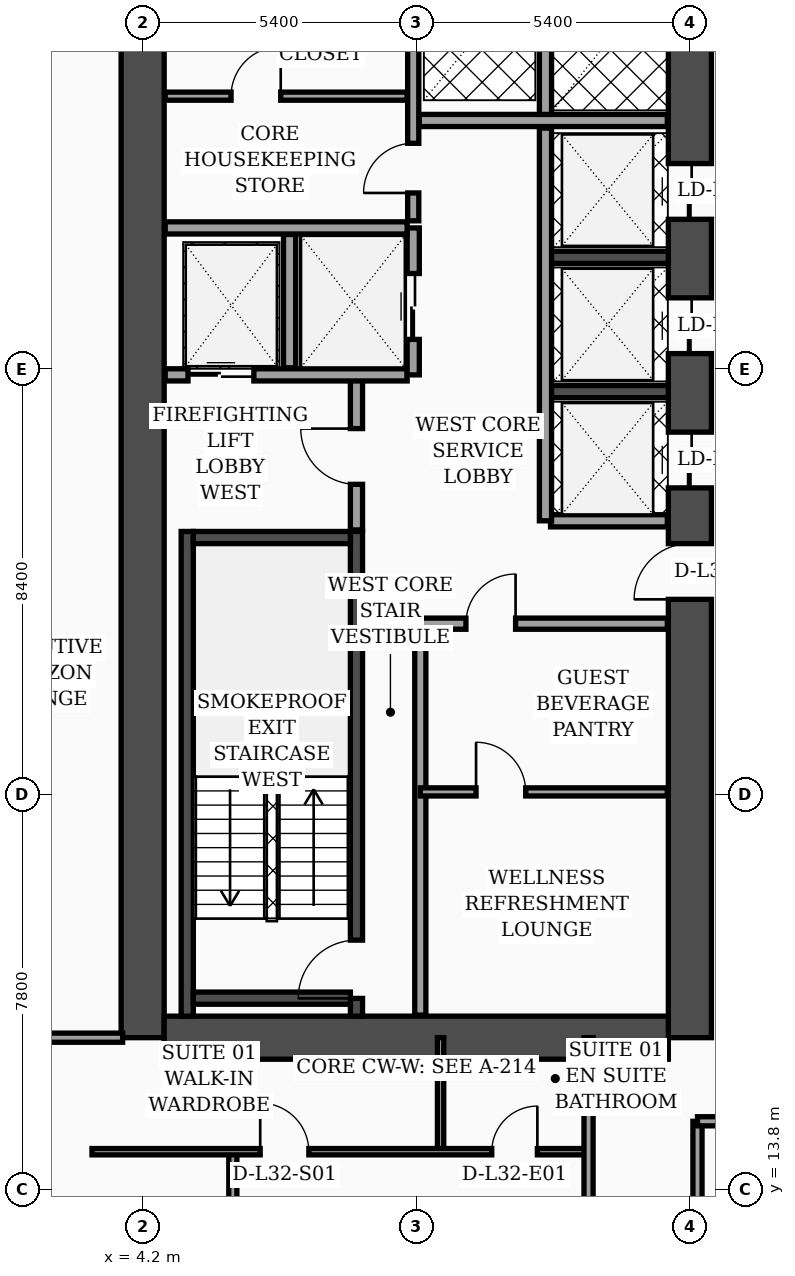
"""IFC4 building model, lengths in metres.
Left out: names, types, materials, properties, quantities, classifications, styles, units other than length and angle.
Written with IfcOpenShell. Run it as: python <this file> out.ifc"""

import sys

from ifc_helpers import new_model, si_unit, direction, frame, frame_2d, origin, place, context, subcontext, project, spatial, rectangle, extrude, element, fill, save


model = new_model("IFC4")
c1 = context("Model", 3, precision=1e-05, world=origin(), true_north=direction((0.0, 1.0)))
c2 = subcontext(c1, "Body", "Model", "MODEL_VIEW")
j1 = project(units=[si_unit("LENGTHUNIT", "METRE"), si_unit("PLANEANGLEUNIT", "RADIAN")], contexts=[c1])
p1 = place(None, origin())
s1 = spatial("IfcSite", under=j1, at=p1, CompositionType="ELEMENT")
p2 = place(p1, origin())
s2 = spatial("IfcBuilding", under=s1, at=p2, CompositionType="ELEMENT")
p3 = place(p2, frame((0.0, 0.0, 131.6)))
s3 = spatial("IfcBuildingStorey", under=s2, at=p3, CompositionType="ELEMENT", Elevation=131.6)
p4 = place(p3, frame((4.2, 16.8, 0.0), z_axis=(0.0, 0.0, 1.0), x_axis=(0.0, 1.0, 0.0)))
e1 = element("IfcWall", 1, at=p4, inside=s3, PredefinedType="SHEAR", context=c2, shape_type="SweptSolid", body=[
    extrude(rectangle(XDim=21.6, YDim=0.85, at=frame_2d((10.8, 0.0))), origin(), (0.0, 0.0, 1.0), 3.56),
])
p5 = place(p3, frame((15.0, 16.8, 0.0), z_axis=(0.0, 0.0, 1.0), x_axis=(0.0, 1.0, 0.0)))
e2 = element("IfcWall", 2, at=p5, inside=s3, PredefinedType="SHEAR", context=c2, shape_type="SweptSolid", body=[
    extrude(rectangle(XDim=21.6, YDim=0.85, at=frame_2d((10.8, 0.0))), origin(), (0.0, 0.0, 1.0), 3.56),
])
p6 = place(p5, frame((8.65, 0.0, 0.0)))
e3 = element("IfcOpeningElement", 3, at=p6, cuts=e2, PredefinedType="OPENING", context=c2, shape_type="SweptSolid", body=[
    extrude(rectangle(XDim=1.1, YDim=2.2, at=frame_2d((0.55, 1.1))), frame((0.0, 0.435, 0.0), z_axis=(0.0, -1.0, 0.0), x_axis=(1.0, 0.0, 0.0)), (0.0, 0.0, 1.0), 0.87),
])
p7 = place(p5, frame((10.85, 0.0, 0.0)))
e4 = element("IfcOpeningElement", 4, at=p7, cuts=e2, PredefinedType="OPENING", context=c2, shape_type="SweptSolid", body=[
    extrude(rectangle(XDim=1.1, YDim=2.2, at=frame_2d((0.55, 1.1))), frame((0.0, 0.435, 0.0), z_axis=(0.0, -1.0, 0.0), x_axis=(1.0, 0.0, 0.0)), (0.0, 0.0, 1.0), 0.87),
])
p8 = place(p5, frame((13.5, 0.0, 0.0)))
e5 = element("IfcOpeningElement", 5, at=p8, cuts=e2, PredefinedType="OPENING", context=c2, shape_type="SweptSolid", body=[
    extrude(rectangle(XDim=1.1, YDim=2.2, at=frame_2d((0.55, 1.1))), frame((0.0, 0.435, 0.0), z_axis=(0.0, -1.0, 0.0), x_axis=(1.0, 0.0, 0.0)), (0.0, 0.0, 1.0), 0.87),
])
p9 = place(p5, frame((16.15, 0.0, 0.0)))
e6 = element("IfcOpeningElement", 6, at=p9, cuts=e2, PredefinedType="OPENING", context=c2, shape_type="SweptSolid", body=[
    extrude(rectangle(XDim=1.1, YDim=2.2, at=frame_2d((0.55, 1.1))), frame((0.0, 0.435, 0.0), z_axis=(0.0, -1.0, 0.0), x_axis=(1.0, 0.0, 0.0)), (0.0, 0.0, 1.0), 0.87),
])
p10 = place(p3, frame((4.625, 16.8, 0.0), z_axis=(0.0, 0.0, 1.0), x_axis=(1.0, 0.0, 0.0)))
e7 = element("IfcWall", 7, at=p10, inside=s3, PredefinedType="SHEAR", context=c2, shape_type="SweptSolid", body=[
    extrude(rectangle(XDim=9.95, YDim=0.85, at=frame_2d((4.975, 0.0))), origin(), (0.0, 0.0, 1.0), 3.56),
])
p11 = place(p3, frame((5.08, 17.225, 0.0), z_axis=(0.0, 0.0, 1.0), x_axis=(0.0, 1.0, 0.0)))
e8 = element("IfcWall", 8, at=p11, inside=s3, PredefinedType="SOLIDWALL", context=c2, shape_type="SweptSolid", body=[
    extrude(rectangle(XDim=9.565, YDim=0.24, at=frame_2d((4.782, 0.0))), origin(), (0.0, 0.0, 1.0), 3.56),
])
p12 = place(p3, frame((8.42, 17.225, 0.0), z_axis=(0.0, 0.0, 1.0), x_axis=(0.0, 1.0, 0.0)))
e9 = element("IfcWall", 9, at=p12, inside=s3, PredefinedType="SOLIDWALL", context=c2, shape_type="SweptSolid", body=[
    extrude(rectangle(XDim=9.565, YDim=0.24, at=frame_2d((4.782, 0.0))), origin(), (0.0, 0.0, 1.0), 3.56),
])
p13 = place(p12, frame((0.35, 0.0, 0.0)))
e10 = element("IfcOpeningElement", 10, at=p13, cuts=e9, PredefinedType="OPENING", context=c2, shape_type="SweptSolid", body=[
    extrude(rectangle(XDim=1.15, YDim=2.2, at=frame_2d((0.575, 1.1))), frame((0.0, 0.13, 0.0), z_axis=(0.0, -1.0, 0.0), x_axis=(1.0, 0.0, 0.0)), (0.0, 0.0, 1.0), 0.26),
])
for number, where, z_axis, x_axis in (
    (11, (5.2, 17.58, 0.0), (0.0, 0.0, 1.0), (1.0, 0.0, 0.0)),
    (12, (5.2, 26.67, 0.0), (0.0, 0.0, 1.0), (1.0, 0.0, 0.0)),
):
    element("IfcWall", number, at=place(p3, frame(where, z_axis=z_axis, x_axis=x_axis)), inside=s3, PredefinedType="SOLIDWALL", context=c2, shape_type="SweptSolid", body=[
        extrude(rectangle(XDim=3.1, YDim=0.24, at=frame_2d((1.55, 0.0))), origin(), (0.0, 0.0, 1.0), 3.56),
    ])
for number, where, z_axis, x_axis in (
    (13, (12.18, 29.55, 0.0), (0.0, 0.0, 1.0), (1.0, 0.0, 0.0)),
    (14, (12.18, 32.2, 0.0), (0.0, 0.0, 1.0), (1.0, 0.0, 0.0)),
):
    element("IfcWall", number, at=place(p3, frame(where, z_axis=z_axis, x_axis=x_axis)), inside=s3, PredefinedType="SOLIDWALL", context=c2, shape_type="SweptSolid", body=[
        extrude(rectangle(XDim=2.395, YDim=0.24, at=frame_2d((1.198, 0.0))), origin(), (0.0, 0.0, 1.0), 3.56),
    ])
p14 = place(p3, frame((8.42, 26.82, 0.0), z_axis=(0.0, 0.0, 1.0), x_axis=(0.0, 1.0, 0.0)))
e15 = element("IfcWall", 15, at=p14, inside=s3, PredefinedType="SOLIDWALL", context=c2, shape_type="SweptSolid", body=[
    extrude(rectangle(XDim=3.0, YDim=0.24, at=frame_2d((1.5, 0.0))), origin(), (0.0, 0.0, 1.0), 3.56),
])
p15 = place(p14, frame((0.9, 0.0, 0.0)))
e16 = element("IfcOpeningElement", 16, at=p15, cuts=e15, PredefinedType="OPENING", context=c2, shape_type="SweptSolid", body=[
    extrude(rectangle(XDim=1.1, YDim=2.2, at=frame_2d((0.55, 1.1))), frame((0.0, 0.13, 0.0), z_axis=(0.0, -1.0, 0.0), x_axis=(1.0, 0.0, 0.0)), (0.0, 0.0, 1.0), 0.26),
])
p16 = place(p3, frame((4.645, 29.88, 0.0), z_axis=(0.0, 0.0, 1.0), x_axis=(1.0, 0.0, 0.0)))
e17 = element("IfcWall", 17, at=p16, inside=s3, PredefinedType="SOLIDWALL", context=c2, shape_type="SweptSolid", body=[
    extrude(rectangle(XDim=4.775, YDim=0.24, at=frame_2d((2.387, 0.0))), origin(), (0.0, 0.0, 1.0), 3.56),
])
p17 = place(p16, frame((0.45, 0.0, 0.0)))
e18 = element("IfcOpeningElement", 18, at=p17, cuts=e17, PredefinedType="OPENING", context=c2, shape_type="SweptSolid", body=[
    extrude(rectangle(XDim=1.3, YDim=2.35, at=frame_2d((0.65, 1.175))), frame((0.0, 0.13, 0.0), z_axis=(0.0, -1.0, 0.0), x_axis=(1.0, 0.0, 0.0)), (0.0, 0.0, 1.0), 0.26),
])
p18 = place(p3, frame((7.1, 30.02, 0.0), z_axis=(0.0, 0.0, 1.0), x_axis=(0.0, 1.0, 0.0)))
e19 = element("IfcWall", 19, at=p18, inside=s3, PredefinedType="SOLIDWALL", context=c2, shape_type="SweptSolid", body=[
    extrude(rectangle(XDim=2.63, YDim=0.24, at=frame_2d((1.315, 0.0))), origin(), (0.0, 0.0, 1.0), 3.56),
])
p19 = place(p3, frame((9.54, 29.88, 0.0), z_axis=(0.0, 0.0, 1.0), x_axis=(0.0, 1.0, 0.0)))
e20 = element("IfcWall", 20, at=p19, inside=s3, PredefinedType="SOLIDWALL", context=c2, shape_type="SweptSolid", body=[
    extrude(rectangle(XDim=2.9, YDim=0.24, at=frame_2d((1.45, 0.0))), origin(), (0.0, 0.0, 1.0), 3.56),
])
p20 = place(p19, frame((0.7, 0.0, 0.0)))
e21 = element("IfcOpeningElement", 21, at=p20, cuts=e20, PredefinedType="OPENING", context=c2, shape_type="SweptSolid", body=[
    extrude(rectangle(XDim=1.3, YDim=2.35, at=frame_2d((0.65, 1.175))), frame((0.0, 0.13, 0.0), z_axis=(0.0, -1.0, 0.0), x_axis=(1.0, 0.0, 0.0)), (0.0, 0.0, 1.0), 0.26),
])
p21 = place(p3, frame((4.645, 32.78, 0.0), z_axis=(0.0, 0.0, 1.0), x_axis=(1.0, 0.0, 0.0)))
e22 = element("IfcWall", 22, at=p21, inside=s3, PredefinedType="SOLIDWALL", context=c2, shape_type="SweptSolid", body=[
    extrude(rectangle(XDim=4.775, YDim=0.24, at=frame_2d((2.387, 0.0))), origin(), (0.0, 0.0, 1.0), 3.19),
])
p22 = place(p3, frame((9.68, 17.245, 0.0), z_axis=(0.0, 0.0, 1.0), x_axis=(0.0, 1.0, 0.0)))
e23 = element("IfcWall", 23, at=p22, inside=s3, PredefinedType="SOLIDWALL", context=c2, shape_type="SweptSolid", body=[
    extrude(rectangle(XDim=7.755, YDim=0.22, at=frame_2d((3.877, 0.0))), origin(), (0.0, 0.0, 1.0), 3.56),
])
p23 = place(p3, frame((4.645, 35.38, 0.0), z_axis=(0.0, 0.0, 1.0), x_axis=(1.0, 0.0, 0.0)))
e24 = element("IfcWall", 24, at=p23, inside=s3, PredefinedType="PARTITIONING", context=c2, shape_type="SweptSolid", body=[
    extrude(rectangle(XDim=4.775, YDim=0.16, at=frame_2d((2.387, 0.0))), origin(), (0.0, 0.0, 1.0), 3.56),
])
p24 = place(p23, frame((1.3, 0.0, 0.0)))
e25 = element("IfcOpeningElement", 25, at=p24, cuts=e24, PredefinedType="OPENING", context=c2, shape_type="SweptSolid", body=[
    extrude(rectangle(XDim=0.98, YDim=2.15, at=frame_2d((0.49, 1.075))), frame((0.0, 0.09, 0.0), z_axis=(0.0, -1.0, 0.0), x_axis=(1.0, 0.0, 0.0)), (0.0, 0.0, 1.0), 0.18),
])
p25 = place(p3, frame((9.54, 32.92, 0.0), z_axis=(0.0, 0.0, 1.0), x_axis=(0.0, 1.0, 0.0)))
e26 = element("IfcWall", 26, at=p25, inside=s3, PredefinedType="SOLIDWALL", context=c2, shape_type="SweptSolid", body=[
    extrude(rectangle(XDim=5.035, YDim=0.22, at=frame_2d((2.518, 0.0))), origin(), (0.0, 0.0, 1.0), 3.56),
])
p26 = place(p25, frame((0.55, 0.0, 0.0)))
e27 = element("IfcOpeningElement", 27, at=p26, cuts=e26, PredefinedType="OPENING", context=c2, shape_type="SweptSolid", body=[
    extrude(rectangle(XDim=0.98, YDim=2.15, at=frame_2d((0.49, 1.075))), frame((0.0, 0.12, 0.0), z_axis=(0.0, -1.0, 0.0), x_axis=(1.0, 0.0, 0.0)), (0.0, 0.0, 1.0), 0.24),
])
p27 = place(p3, frame((9.68, 21.65, 0.0), z_axis=(0.0, 0.0, 1.0), x_axis=(1.0, 0.0, 0.0)))
e28 = element("IfcWall", 28, at=p27, inside=s3, PredefinedType="PARTITIONING", context=c2, shape_type="SweptSolid", body=[
    extrude(rectangle(XDim=4.875, YDim=0.16, at=frame_2d((2.438, 0.0))), origin(), (0.0, 0.0, 1.0), 3.09),
])
p28 = place(p27, frame((1.1, 0.0, 0.0)))
e29 = element("IfcOpeningElement", 29, at=p28, cuts=e28, PredefinedType="OPENING", context=c2, shape_type="SweptSolid", body=[
    extrude(rectangle(XDim=0.98, YDim=2.15, at=frame_2d((0.49, 1.075))), frame((0.0, 0.09, 0.0), z_axis=(0.0, -1.0, 0.0), x_axis=(1.0, 0.0, 0.0)), (0.0, 0.0, 1.0), 0.18),
])
p29 = place(p3, frame((9.68, 24.97, 0.0), z_axis=(0.0, 0.0, 1.0), x_axis=(1.0, 0.0, 0.0)))
e30 = element("IfcWall", 30, at=p29, inside=s3, PredefinedType="SOLIDWALL", context=c2, shape_type="SweptSolid", body=[
    extrude(rectangle(XDim=4.875, YDim=0.22, at=frame_2d((2.438, 0.0))), origin(), (0.0, 0.0, 1.0), 2.84),
])
p30 = place(p29, frame((0.9, 0.0, 0.0)))
e31 = element("IfcOpeningElement", 31, at=p30, cuts=e30, PredefinedType="OPENING", context=c2, shape_type="SweptSolid", body=[
    extrude(rectangle(XDim=0.98, YDim=2.15, at=frame_2d((0.49, 1.075))), frame((0.0, 0.12, 0.0), z_axis=(0.0, -1.0, 0.0), x_axis=(1.0, 0.0, 0.0)), (0.0, 0.0, 1.0), 0.24),
])
p31 = place(p3, frame((12.25, 27.0, 0.0), z_axis=(0.0, 0.0, 1.0), x_axis=(1.0, 0.0, 0.0)))
e32 = element("IfcWall", 32, at=p31, inside=s3, PredefinedType="SOLIDWALL", context=c2, shape_type="SweptSolid", body=[
    extrude(rectangle(XDim=2.305, YDim=0.24, at=frame_2d((1.152, 0.0))), origin(), (0.0, 0.0, 1.0), 3.56),
])
p32 = place(p3, frame((12.15, 27.0, 0.0), z_axis=(0.0, 0.0, 1.0), x_axis=(0.0, 1.0, 0.0)))
e33 = element("IfcWall", 33, at=p32, inside=s3, PredefinedType="SOLIDWALL", context=c2, shape_type="SweptSolid", body=[
    extrude(rectangle(XDim=7.75, YDim=0.24, at=frame_2d((3.875, 0.0))), origin(), (0.0, 0.0, 1.0), 3.56),
])
p33 = place(p3, frame((9.66, 34.9, 0.0), z_axis=(0.0, 0.0, 1.0), x_axis=(1.0, 0.0, 0.0)))
e34 = element("IfcWall", 34, at=p33, inside=s3, PredefinedType="SOLIDWALL", context=c2, shape_type="SweptSolid", body=[
    extrude(rectangle(XDim=4.895, YDim=0.24, at=frame_2d((2.448, 0.0))), origin(), (0.0, 0.0, 1.0), 3.56),
])
p34 = place(p3, frame((12.15, 35.02, 0.0), z_axis=(0.0, 0.0, 1.0), x_axis=(0.0, 1.0, 0.0)))
e35 = element("IfcWall", 35, at=p34, inside=s3, PredefinedType="SOLIDWALL", context=c2, shape_type="SweptSolid", body=[
    extrude(rectangle(XDim=2.935, YDim=0.24, at=frame_2d((1.468, 0.0))), origin(), (0.0, 0.0, 1.0), 3.56),
])
p35 = place(p3, frame((0.08, 16.8, 0.0), z_axis=(0.0, 0.0, 1.0), x_axis=(1.0, 0.0, 0.0)))
e36 = element("IfcWall", 36, at=p35, inside=s3, PredefinedType="PARTITIONING", context=c2, shape_type="SweptSolid", body=[
    extrude(rectangle(XDim=3.725, YDim=0.18, at=frame_2d((1.862, 0.0))), origin(), (0.0, 0.0, 1.0), 2.84),
])
p36 = place(p3, frame((10.08, 14.55, 0.0), z_axis=(0.0, 0.0, 1.0), x_axis=(0.0, 1.0, 0.0)))
e37 = element("IfcWall", 37, at=p36, inside=s3, PredefinedType="PARTITIONING", context=c2, shape_type="SweptSolid", body=[
    extrude(rectangle(XDim=2.25, YDim=0.125, at=frame_2d((1.125, 0.0))), origin(), (0.0, 0.0, 1.0), 3.56),
])
p37 = place(p3, frame((5.98, 2.44, 0.0), z_axis=(0.0, 0.0, 1.0), x_axis=(0.0, 1.0, 0.0)))
e38 = element("IfcWall", 38, at=p37, inside=s3, PredefinedType="PARTITIONING", context=c2, shape_type="SweptSolid", body=[
    extrude(rectangle(XDim=12.11, YDim=0.16, at=frame_2d((6.055, 0.0))), origin(), (0.0, 0.0, 1.0), 3.04),
])
p38 = place(p37, frame((5.58, 0.0, 0.0)))
e39 = element("IfcOpeningElement", 39, at=p38, cuts=e38, PredefinedType="OPENING", context=c2, shape_type="SweptSolid", body=[
    extrude(rectangle(XDim=0.96, YDim=2.2, at=frame_2d((0.48, 1.1))), frame((0.0, 0.09, 0.0), z_axis=(0.0, -1.0, 0.0), x_axis=(1.0, 0.0, 0.0)), (0.0, 0.0, 1.0), 0.18),
])
p39 = place(p3, frame((3.2, 14.55, 0.0), z_axis=(0.0, 0.0, 1.0), x_axis=(1.0, 0.0, 0.0)))
e40 = element("IfcWall", 40, at=p39, inside=s3, PredefinedType="PARTITIONING", context=c2, shape_type="SweptSolid", body=[
    extrude(rectangle(XDim=9.8, YDim=0.125, at=frame_2d((4.9, 0.0))), origin(), (0.0, 0.0, 1.0), 2.84),
])
p40 = place(p39, frame((3.32, 0.0, 0.0)))
e41 = element("IfcOpeningElement", 41, at=p40, cuts=e40, PredefinedType="OPENING", context=c2, shape_type="SweptSolid", body=[
    extrude(rectangle(XDim=0.96, YDim=2.2, at=frame_2d((0.48, 1.1))), frame((0.0, 0.073, 0.0), z_axis=(0.0, -1.0, 0.0), x_axis=(1.0, 0.0, 0.0)), (0.0, 0.0, 1.0), 0.145),
])
p41 = place(p39, frame((7.89, 0.0, 0.0)))
e42 = element("IfcOpeningElement", 42, at=p41, cuts=e40, PredefinedType="OPENING", context=c2, shape_type="SweptSolid", body=[
    extrude(rectangle(XDim=0.9, YDim=2.15, at=frame_2d((0.45, 1.075))), frame((0.0, 0.073, 0.0), z_axis=(0.0, -1.0, 0.0), x_axis=(1.0, 0.0, 0.0)), (0.0, 0.0, 1.0), 0.145),
])
p42 = place(p3, frame((13.0, 2.44, 0.0), z_axis=(0.0, 0.0, 1.0), x_axis=(0.0, 1.0, 0.0)))
e43 = element("IfcWall", 43, at=p42, inside=s3, PredefinedType="PARTITIONING", context=c2, shape_type="SweptSolid", body=[
    extrude(rectangle(XDim=14.36, YDim=0.18, at=frame_2d((7.18, 0.0))), origin(), (0.0, 0.0, 1.0), 2.84),
])
p43 = place(p42, frame((3.01, 0.0, 0.0)))
e44 = element("IfcOpeningElement", 44, at=p43, cuts=e43, PredefinedType="OPENING", context=c2, shape_type="SweptSolid", body=[
    extrude(rectangle(XDim=1.02, YDim=2.2, at=frame_2d((0.51, 1.1))), frame((0.0, 0.1, 0.0), z_axis=(0.0, -1.0, 0.0), x_axis=(1.0, 0.0, 0.0)), (0.0, 0.0, 1.0), 0.2),
])
p44 = place(p3, frame((15.15, 2.44, 0.0), z_axis=(0.0, 0.0, 1.0), x_axis=(0.0, 1.0, 0.0)))
e45 = element("IfcWall", 45, at=p44, inside=s3, PredefinedType="PARTITIONING", context=c2, shape_type="SweptSolid", body=[
    extrude(rectangle(XDim=12.71, YDim=0.18, at=frame_2d((6.355, 0.0))), origin(), (0.0, 0.0, 1.0), 3.04),
])
p45 = place(p3, frame((15.15, 15.15, 0.0), z_axis=(0.0, 0.0, 1.0), x_axis=(1.0, 0.0, 0.0)))
e46 = element("IfcWall", 46, at=p45, inside=s3, PredefinedType="PARTITIONING", context=c2, shape_type="SweptSolid", body=[
    extrude(rectangle(XDim=6.45, YDim=0.18, at=frame_2d((3.225, 0.0))), origin(), (0.0, 0.0, 1.0), 2.49),
])
p46 = place(p45, frame((1.74, 0.0, 0.0)))
e47 = element("IfcOpeningElement", 47, at=p46, cuts=e46, PredefinedType="OPENING", context=c2, shape_type="SweptSolid", body=[
    extrude(rectangle(XDim=1.02, YDim=2.2, at=frame_2d((0.51, 1.1))), frame((0.0, 0.1, 0.0), z_axis=(0.0, -1.0, 0.0), x_axis=(1.0, 0.0, 0.0)), (0.0, 0.0, 1.0), 0.2),
])
p47 = place(p15, origin())
e48 = element("IfcDoor", 48, at=p47, inside=s3, OperationType="SINGLE_SWING_RIGHT", PredefinedType="DOOR", context=c2, shape_type="SweptSolid", body=[
    extrude(rectangle(XDim=1.1, YDim=2.2, at=frame_2d((0.55, 1.1))), frame((0.0, 0.025, 0.0), z_axis=(0.0, -1.0, 0.0), x_axis=(1.0, 0.0, 0.0)), (0.0, 0.0, 1.0), 0.05),
])
fill(e16, e48)
p48 = place(p17, origin())
e49 = element("IfcDoor", 49, at=p48, inside=s3, OperationType="DOUBLE_DOOR_SLIDING", PredefinedType="DOOR", context=c2, shape_type="SweptSolid", body=[
    extrude(rectangle(XDim=1.3, YDim=2.35, at=frame_2d((0.65, 1.175))), frame((0.0, 0.025, 0.0), z_axis=(0.0, -1.0, 0.0), x_axis=(1.0, 0.0, 0.0)), (0.0, 0.0, 1.0), 0.05),
])
fill(e18, e49)
p49 = place(p20, origin())
e50 = element("IfcDoor", 50, at=p49, inside=s3, OperationType="DOUBLE_DOOR_SLIDING", PredefinedType="DOOR", context=c2, shape_type="SweptSolid", body=[
    extrude(rectangle(XDim=1.3, YDim=2.35, at=frame_2d((0.65, 1.175))), frame((0.0, 0.025, 0.0), z_axis=(0.0, -1.0, 0.0), x_axis=(1.0, 0.0, 0.0)), (0.0, 0.0, 1.0), 0.05),
])
fill(e21, e50)
p50 = place(p24, origin())
e51 = element("IfcDoor", 51, at=p50, inside=s3, OperationType="SINGLE_SWING_RIGHT", PredefinedType="DOOR", context=c2, shape_type="SweptSolid", body=[
    extrude(rectangle(XDim=0.98, YDim=2.15, at=frame_2d((0.49, 1.075))), frame((0.0, 0.025, 0.0), z_axis=(0.0, -1.0, 0.0), x_axis=(1.0, 0.0, 0.0)), (0.0, 0.0, 1.0), 0.05),
])
fill(e25, e51)
p51 = place(p26, origin())
e52 = element("IfcDoor", 52, at=p51, inside=s3, OperationType="SINGLE_SWING_LEFT", PredefinedType="DOOR", context=c2, shape_type="SweptSolid", body=[
    extrude(rectangle(XDim=0.98, YDim=2.15, at=frame_2d((0.49, 1.075))), frame((0.0, 0.025, 0.0), z_axis=(0.0, -1.0, 0.0), x_axis=(1.0, 0.0, 0.0)), (0.0, 0.0, 1.0), 0.05),
])
fill(e27, e52)
p52 = place(p28, origin())
e53 = element("IfcDoor", 53, at=p52, inside=s3, OperationType="SINGLE_SWING_LEFT", PredefinedType="DOOR", context=c2, shape_type="SweptSolid", body=[
    extrude(rectangle(XDim=0.98, YDim=2.15, at=frame_2d((0.49, 1.075))), frame((0.0, 0.025, 0.0), z_axis=(0.0, -1.0, 0.0), x_axis=(1.0, 0.0, 0.0)), (0.0, 0.0, 1.0), 0.05),
])
fill(e29, e53)
p53 = place(p30, origin())
e54 = element("IfcDoor", 54, at=p53, inside=s3, OperationType="SINGLE_SWING_RIGHT", PredefinedType="DOOR", context=c2, shape_type="SweptSolid", body=[
    extrude(rectangle(XDim=0.98, YDim=2.15, at=frame_2d((0.49, 1.075))), frame((0.0, 0.025, 0.0), z_axis=(0.0, -1.0, 0.0), x_axis=(1.0, 0.0, 0.0)), (0.0, 0.0, 1.0), 0.05),
])
fill(e31, e54)
p54 = place(p40, origin())
e55 = element("IfcDoor", 55, at=p54, inside=s3, OperationType="SINGLE_SWING_LEFT", PredefinedType="DOOR", context=c2, shape_type="SweptSolid", body=[
    extrude(rectangle(XDim=0.96, YDim=2.2, at=frame_2d((0.48, 1.1))), frame((0.0, 0.025, 0.0), z_axis=(0.0, -1.0, 0.0), x_axis=(1.0, 0.0, 0.0)), (0.0, 0.0, 1.0), 0.05),
])
fill(e41, e55)
p55 = place(p41, origin())
e56 = element("IfcDoor", 56, at=p55, inside=s3, OperationType="SINGLE_SWING_RIGHT", PredefinedType="DOOR", context=c2, shape_type="SweptSolid", body=[
    extrude(rectangle(XDim=0.9, YDim=2.15, at=frame_2d((0.45, 1.075))), frame((0.0, 0.025, 0.0), z_axis=(0.0, -1.0, 0.0), x_axis=(1.0, 0.0, 0.0)), (0.0, 0.0, 1.0), 0.05),
])
fill(e42, e56)
p56 = place(p13, origin())
e57 = element("IfcDoor", 57, at=p56, inside=s3, OperationType="SINGLE_SWING_LEFT", PredefinedType="DOOR", context=c2, shape_type="SweptSolid", body=[
    extrude(rectangle(XDim=1.15, YDim=2.2, at=frame_2d((0.575, 1.1))), frame((0.0, 0.025, 0.0), z_axis=(0.0, -1.0, 0.0), x_axis=(1.0, 0.0, 0.0)), (0.0, 0.0, 1.0), 0.05),
])
fill(e10, e57)
p57 = place(p6, origin())
e58 = element("IfcDoor", 58, at=p57, inside=s3, OperationType="SINGLE_SWING_LEFT", PredefinedType="DOOR", context=c2, shape_type="SweptSolid", body=[
    extrude(rectangle(XDim=1.1, YDim=2.2, at=frame_2d((0.55, 1.1))), frame((0.0, 0.025, 0.0), z_axis=(0.0, -1.0, 0.0), x_axis=(1.0, 0.0, 0.0)), (0.0, 0.0, 1.0), 0.05),
])
fill(e3, e58)
p58 = place(p7, origin())
e59 = element("IfcDoor", 59, at=p58, inside=s3, OperationType="DOUBLE_DOOR_SLIDING", PredefinedType="DOOR", context=c2, shape_type="SweptSolid", body=[
    extrude(rectangle(XDim=1.1, YDim=2.2, at=frame_2d((0.55, 1.1))), frame((0.0, 0.025, 0.0), z_axis=(0.0, -1.0, 0.0), x_axis=(1.0, 0.0, 0.0)), (0.0, 0.0, 1.0), 0.05),
])
fill(e4, e59)
p59 = place(p8, origin())
e60 = element("IfcDoor", 60, at=p59, inside=s3, OperationType="DOUBLE_DOOR_SLIDING", PredefinedType="DOOR", context=c2, shape_type="SweptSolid", body=[
    extrude(rectangle(XDim=1.1, YDim=2.2, at=frame_2d((0.55, 1.1))), frame((0.0, 0.025, 0.0), z_axis=(0.0, -1.0, 0.0), x_axis=(1.0, 0.0, 0.0)), (0.0, 0.0, 1.0), 0.05),
])
fill(e5, e60)
p60 = place(p9, origin())
e61 = element("IfcDoor", 61, at=p60, inside=s3, OperationType="DOUBLE_DOOR_SLIDING", PredefinedType="DOOR", context=c2, shape_type="SweptSolid", body=[
    extrude(rectangle(XDim=1.1, YDim=2.2, at=frame_2d((0.55, 1.1))), frame((0.0, 0.025, 0.0), z_axis=(0.0, -1.0, 0.0), x_axis=(1.0, 0.0, 0.0)), (0.0, 0.0, 1.0), 0.05),
])
fill(e6, e61)
save(model, sys.argv[1])
